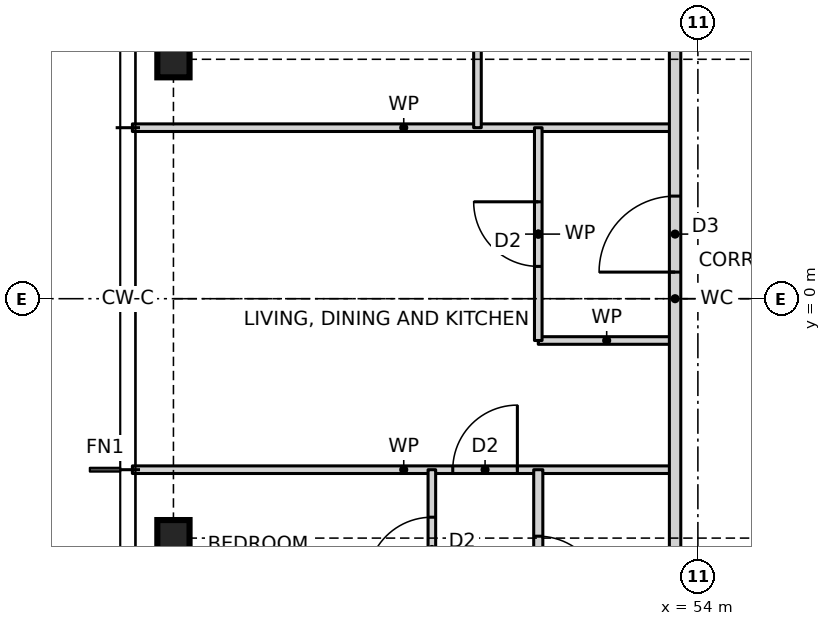
"""IFC4 building model, lengths in metres.
Left out: names, types, materials, properties, quantities, classifications, styles, units other than length and angle.
Written with IfcOpenShell. Run it as: python <this file> out.ifc"""

import sys

from ifc_helpers import new_model, si_unit, direction, frame, frame_2d, origin, origin_2d, place, context, subcontext, project, spatial, rectangle, i_section, extrude, element, fill, save


model = new_model("IFC4")
c1 = context("Model", 3, precision=1e-05, world=origin(), true_north=direction((0.0, 1.0)))
c2 = subcontext(c1, "Body", "Model", "MODEL_VIEW")
j1 = project(units=[si_unit("LENGTHUNIT", "METRE"), si_unit("PLANEANGLEUNIT", "RADIAN")], contexts=[c1])
p1 = place(None, origin())
s1 = spatial("IfcSite", under=j1, at=p1, CompositionType="ELEMENT")
p2 = place(p1, origin())
s2 = spatial("IfcBuilding", under=s1, at=p2, CompositionType="ELEMENT")
p3 = place(p2, frame((0.0, 0.0, 46.5)))
s3 = spatial("IfcBuildingStorey", under=s2, at=p3, CompositionType="ELEMENT", Elevation=46.5)
for number, where, z_axis, x_axis in (
    (1, (47.1, 3.15, 0.0), (0.0, 0.0, 1.0), (1.0, 0.0, 0.0)),
    (2, (47.1, -3.15, 0.0), (0.0, 0.0, 1.0), (1.0, 0.0, 0.0)),
):
    element("IfcColumn", number, at=place(p3, frame(where, z_axis=z_axis, x_axis=x_axis)), inside=s3, PredefinedType="COLUMN", context=c2, shape_type="SweptSolid", body=[
        extrude(i_section(OverallWidth=0.424, OverallDepth=0.475, WebThickness=0.048, FlangeThickness=0.077, at=origin_2d()), origin(), (0.0, 0.0, 1.0), 3.5),
    ])
p4 = place(p3, frame((46.56, -2.25, 0.0), z_axis=(0.0, 0.0, 1.0), x_axis=(1.0, 0.0, 0.0)))
e3 = element("IfcWall", 3, at=p4, inside=s3, PredefinedType="PARTITIONING", context=c2, shape_type="SweptSolid", body=[
    extrude(rectangle(XDim=7.14, YDim=0.1, at=frame_2d((3.57, 0.0))), origin(), (0.0, 0.0, 1.0), 3.27),
])
p5 = place(p4, frame((4.215, 0.0, 0.0)))
e4 = element("IfcOpeningElement", 4, at=p5, cuts=e3, PredefinedType="OPENING", context=c2, shape_type="SweptSolid", body=[
    extrude(rectangle(XDim=0.85, YDim=2.1, at=frame_2d((0.425, 1.05))), frame((0.0, 0.06, 0.0), z_axis=(0.0, -1.0, 0.0), x_axis=(1.0, 0.0, 0.0)), (0.0, 0.0, 1.0), 0.12),
])
p6 = place(p3, frame((51.9, -0.55, 0.0), z_axis=(0.0, 0.0, 1.0), x_axis=(1.0, 0.0, 0.0)))
e5 = element("IfcWall", 5, at=p6, inside=s3, PredefinedType="PARTITIONING", context=c2, shape_type="SweptSolid", body=[
    extrude(rectangle(XDim=1.8, YDim=0.1, at=frame_2d((0.9, 0.0))), origin(), (0.0, 0.0, 1.0), 3.27),
])
p7 = place(p3, frame((46.56, 2.25, 0.0), z_axis=(0.0, 0.0, 1.0), x_axis=(1.0, 0.0, 0.0)))
e6 = element("IfcWall", 6, at=p7, inside=s3, PredefinedType="PARTITIONING", context=c2, shape_type="SweptSolid", body=[
    extrude(rectangle(XDim=7.14, YDim=0.1, at=frame_2d((3.57, 0.0))), origin(), (0.0, 0.0, 1.0), 3.27),
])
p8 = place(p3, frame((53.7, -10.568, 0.0), z_axis=(0.0, 0.0, 1.0), x_axis=(0.0, 1.0, 0.0)))
e7 = element("IfcWall", 7, at=p8, inside=s3, PredefinedType="PARTITIONING", context=c2, shape_type="SweptSolid", body=[
    extrude(rectangle(XDim=21.136, YDim=0.15, at=frame_2d((10.568, 0.0))), origin(), (0.0, 0.0, 1.0), 3.27),
])
p9 = place(p8, frame((16.318, 0.0, 0.0)))
e8 = element("IfcOpeningElement", 8, at=p9, cuts=e7, PredefinedType="OPENING", context=c2, shape_type="SweptSolid", body=[
    extrude(rectangle(XDim=1.0, YDim=2.1, at=frame_2d((0.5, 1.05))), frame((0.0, 0.085, 0.0), z_axis=(0.0, -1.0, 0.0), x_axis=(1.0, 0.0, 0.0)), (0.0, 0.0, 1.0), 0.17),
])
p10 = place(p8, frame((10.918, 0.0, 0.0)))
e9 = element("IfcOpeningElement", 9, at=p10, cuts=e7, PredefinedType="OPENING", context=c2, shape_type="SweptSolid", body=[
    extrude(rectangle(XDim=1.0, YDim=2.1, at=frame_2d((0.5, 1.05))), frame((0.0, 0.085, 0.0), z_axis=(0.0, -1.0, 0.0), x_axis=(1.0, 0.0, 0.0)), (0.0, 0.0, 1.0), 0.17),
])
p11 = place(p3, frame((51.9, -12.614, 0.0), z_axis=(0.0, 0.0, 1.0), x_axis=(0.0, 1.0, 0.0)))
e10 = element("IfcWall", 10, at=p11, inside=s3, PredefinedType="PARTITIONING", context=c2, shape_type="SweptSolid", body=[
    extrude(rectangle(XDim=10.364, YDim=0.12, at=frame_2d((5.182, 0.0))), origin(), (0.0, 0.0, 1.0), 3.27),
])
p12 = place(p11, frame((8.639, 0.0, 0.0)))
e11 = element("IfcOpeningElement", 11, at=p12, cuts=e10, PredefinedType="OPENING", context=c2, shape_type="SweptSolid", body=[
    extrude(rectangle(XDim=0.85, YDim=2.1, at=frame_2d((0.425, 1.05))), frame((0.0, 0.07, 0.0), z_axis=(0.0, -1.0, 0.0), x_axis=(1.0, 0.0, 0.0)), (0.0, 0.0, 1.0), 0.14),
])
p13 = place(p11, frame((5.139, 0.0, 0.0)))
e12 = element("IfcOpeningElement", 12, at=p13, cuts=e10, PredefinedType="OPENING", context=c2, shape_type="SweptSolid", body=[
    extrude(rectangle(XDim=0.85, YDim=2.1, at=frame_2d((0.425, 1.05))), frame((0.0, 0.07, 0.0), z_axis=(0.0, -1.0, 0.0), x_axis=(1.0, 0.0, 0.0)), (0.0, 0.0, 1.0), 0.14),
])
p14 = place(p11, frame((1.257, 0.0, 0.0)))
e13 = element("IfcOpeningElement", 13, at=p14, cuts=e10, PredefinedType="OPENING", context=c2, shape_type="SweptSolid", body=[
    extrude(rectangle(XDim=0.85, YDim=2.1, at=frame_2d((0.425, 1.05))), frame((0.0, 0.07, 0.0), z_axis=(0.0, -1.0, 0.0), x_axis=(1.0, 0.0, 0.0)), (0.0, 0.0, 1.0), 0.14),
])
p15 = place(p3, frame((51.9, -0.55, 0.0), z_axis=(0.0, 0.0, 1.0), x_axis=(0.0, 1.0, 0.0)))
e14 = element("IfcWall", 14, at=p15, inside=s3, PredefinedType="PARTITIONING", context=c2, shape_type="SweptSolid", body=[
    extrude(rectangle(XDim=2.8, YDim=0.1, at=frame_2d((1.4, 0.0))), origin(), (0.0, 0.0, 1.0), 3.27),
])
p16 = place(p15, frame((0.975, 0.0, 0.0)))
e15 = element("IfcOpeningElement", 15, at=p16, cuts=e14, PredefinedType="OPENING", context=c2, shape_type="SweptSolid", body=[
    extrude(rectangle(XDim=0.85, YDim=2.1, at=frame_2d((0.425, 1.05))), frame((0.0, 0.06, 0.0), z_axis=(0.0, -1.0, 0.0), x_axis=(1.0, 0.0, 0.0)), (0.0, 0.0, 1.0), 0.12),
])
p17 = place(p3, frame((51.1, 2.25, 0.0), z_axis=(0.0, 0.0, 1.0), x_axis=(0.0, 1.0, 0.0)))
e16 = element("IfcWall", 16, at=p17, inside=s3, PredefinedType="PARTITIONING", context=c2, shape_type="SweptSolid", body=[
    extrude(rectangle(XDim=9.0, YDim=0.1, at=frame_2d((4.5, 0.0))), origin(), (0.0, 0.0, 1.0), 3.27),
])
p18 = place(p17, frame((6.775, 0.0, 0.0)))
e17 = element("IfcOpeningElement", 17, at=p18, cuts=e16, PredefinedType="OPENING", context=c2, shape_type="SweptSolid", body=[
    extrude(rectangle(XDim=0.85, YDim=2.1, at=frame_2d((0.425, 1.05))), frame((0.0, 0.06, 0.0), z_axis=(0.0, -1.0, 0.0), x_axis=(1.0, 0.0, 0.0)), (0.0, 0.0, 1.0), 0.12),
])
p19 = place(p17, frame((3.575, 0.0, 0.0)))
e18 = element("IfcOpeningElement", 18, at=p19, cuts=e16, PredefinedType="OPENING", context=c2, shape_type="SweptSolid", body=[
    extrude(rectangle(XDim=0.85, YDim=2.1, at=frame_2d((0.425, 1.05))), frame((0.0, 0.06, 0.0), z_axis=(0.0, -1.0, 0.0), x_axis=(1.0, 0.0, 0.0)), (0.0, 0.0, 1.0), 0.12),
])
p20 = place(p3, frame((50.5, -13.45, 0.0), z_axis=(0.0, 0.0, 1.0), x_axis=(0.0, 1.0, 0.0)))
e19 = element("IfcWall", 19, at=p20, inside=s3, PredefinedType="PARTITIONING", context=c2, shape_type="SweptSolid", body=[
    extrude(rectangle(XDim=11.2, YDim=0.1, at=frame_2d((5.6, 0.0))), origin(), (0.0, 0.0, 1.0), 3.27),
])
p21 = place(p20, frame((9.725, 0.0, 0.0)))
e20 = element("IfcOpeningElement", 20, at=p21, cuts=e19, PredefinedType="OPENING", context=c2, shape_type="SweptSolid", body=[
    extrude(rectangle(XDim=0.85, YDim=2.1, at=frame_2d((0.425, 1.05))), frame((0.0, 0.06, 0.0), z_axis=(0.0, -1.0, 0.0), x_axis=(1.0, 0.0, 0.0)), (0.0, 0.0, 1.0), 0.12),
])
p22 = place(p20, frame((4.025, 0.0, 0.0)))
e21 = element("IfcOpeningElement", 21, at=p22, cuts=e19, PredefinedType="OPENING", context=c2, shape_type="SweptSolid", body=[
    extrude(rectangle(XDim=0.85, YDim=2.1, at=frame_2d((0.425, 1.05))), frame((0.0, 0.06, 0.0), z_axis=(0.0, -1.0, 0.0), x_axis=(1.0, 0.0, 0.0)), (0.0, 0.0, 1.0), 0.12),
])
p23 = place(p20, frame((0.675, 0.0, 0.0)))
e22 = element("IfcOpeningElement", 22, at=p23, cuts=e19, PredefinedType="OPENING", context=c2, shape_type="SweptSolid", body=[
    extrude(rectangle(XDim=0.85, YDim=2.1, at=frame_2d((0.425, 1.05))), frame((0.0, 0.06, 0.0), z_axis=(0.0, -1.0, 0.0), x_axis=(1.0, 0.0, 0.0)), (0.0, 0.0, 1.0), 0.12),
])
p24 = place(p10, origin())
e23 = element("IfcDoor", 23, at=p24, inside=s3, OperationType="SINGLE_SWING_LEFT", PredefinedType="DOOR", context=c2, shape_type="SweptSolid", body=[
    extrude(rectangle(XDim=1.0, YDim=2.1, at=frame_2d((0.5, 1.05))), frame((0.0, 0.025, 0.0), z_axis=(0.0, -1.0, 0.0), x_axis=(1.0, 0.0, 0.0)), (0.0, 0.0, 1.0), 0.05),
])
fill(e9, e23)
p25 = place(p16, origin())
e24 = element("IfcDoor", 24, at=p25, inside=s3, OperationType="SINGLE_SWING_RIGHT", PredefinedType="DOOR", context=c2, shape_type="SweptSolid", body=[
    extrude(rectangle(XDim=0.85, YDim=2.1, at=frame_2d((0.425, 1.05))), frame((0.0, 0.025, 0.0), z_axis=(0.0, -1.0, 0.0), x_axis=(1.0, 0.0, 0.0)), (0.0, 0.0, 1.0), 0.05),
])
fill(e15, e24)
p26 = place(p5, origin())
e25 = element("IfcDoor", 25, at=p26, inside=s3, OperationType="SINGLE_SWING_RIGHT", PredefinedType="DOOR", context=c2, shape_type="SweptSolid", body=[
    extrude(rectangle(XDim=0.85, YDim=2.1, at=frame_2d((0.425, 1.05))), frame((0.0, 0.025, 0.0), z_axis=(0.0, -1.0, 0.0), x_axis=(1.0, 0.0, 0.0)), (0.0, 0.0, 1.0), 0.05),
])
fill(e4, e25)
p27 = place(p21, origin())
e26 = element("IfcDoor", 26, at=p27, inside=s3, OperationType="SINGLE_SWING_LEFT", PredefinedType="DOOR", context=c2, shape_type="SweptSolid", body=[
    extrude(rectangle(XDim=0.85, YDim=2.1, at=frame_2d((0.425, 1.05))), frame((0.0, 0.025, 0.0), z_axis=(0.0, -1.0, 0.0), x_axis=(1.0, 0.0, 0.0)), (0.0, 0.0, 1.0), 0.05),
])
fill(e20, e26)
p28 = place(p12, frame((0.85, 0.0, 0.0), z_axis=(0.0, 0.0, 1.0), x_axis=(-1.0, 0.0, 0.0)))
e27 = element("IfcDoor", 27, at=p28, inside=s3, OperationType="SINGLE_SWING_RIGHT", PredefinedType="DOOR", context=c2, shape_type="SweptSolid", body=[
    extrude(rectangle(XDim=0.85, YDim=2.1, at=frame_2d((0.425, 1.05))), frame((0.0, 0.025, 0.0), z_axis=(0.0, -1.0, 0.0), x_axis=(1.0, 0.0, 0.0)), (0.0, 0.0, 1.0), 0.05),
])
fill(e11, e27)
save(model, sys.argv[1])
